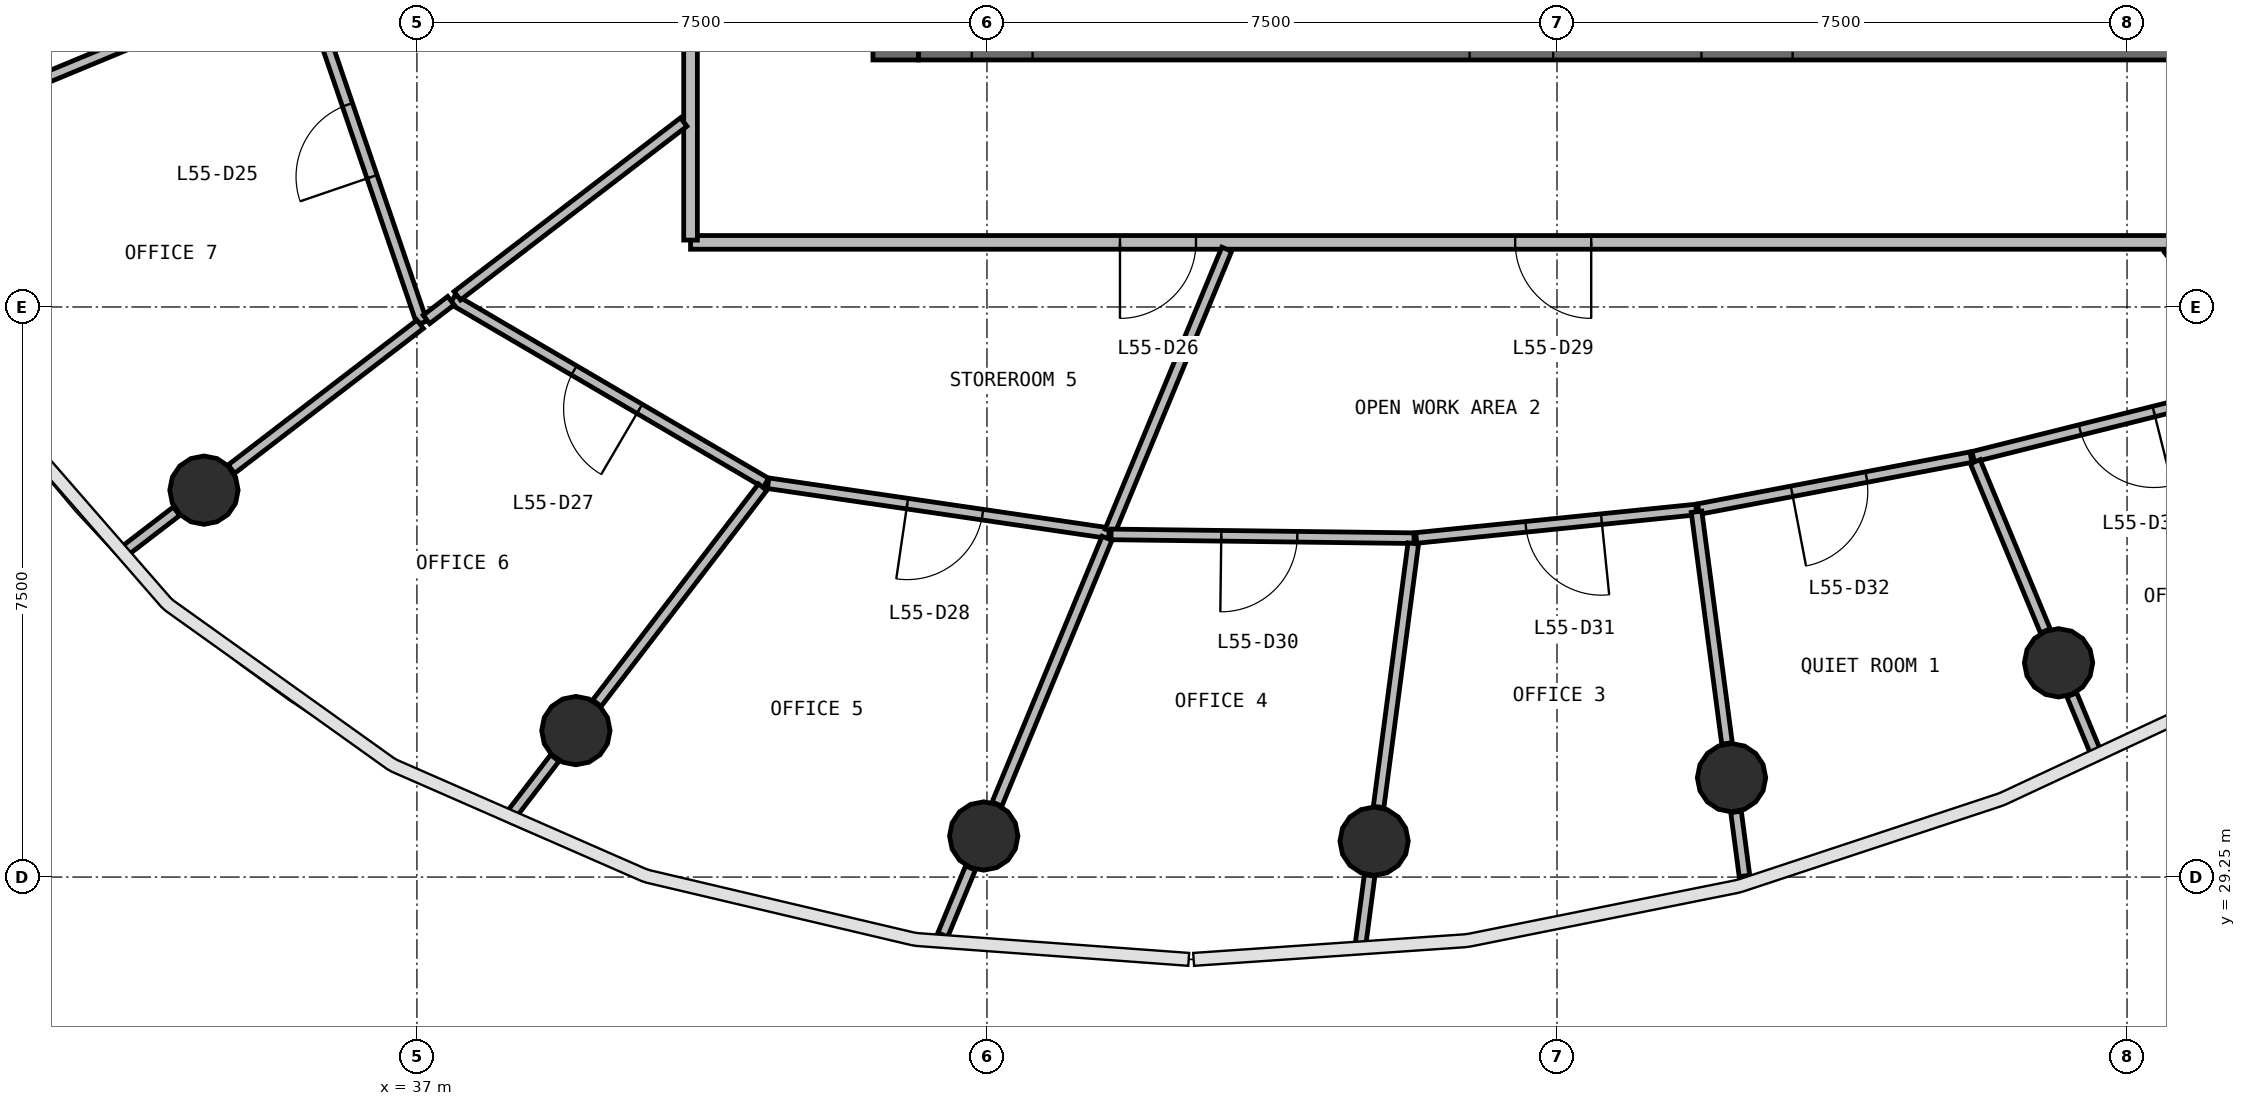
"""IFC4 building model, lengths in metres.
Left out: names, types, materials, properties, quantities, classifications, styles, units other than length and angle.
Written with IfcOpenShell. Run it as: python <this file> out.ifc"""

import sys

from ifc_helpers import new_model, si_unit, direction, frame, frame_2d, origin, origin_2d, place, context, subcontext, project, spatial, rectangle, circle, extrude, source, transform, mapped, element, fill, save


model = new_model("IFC4")
c1 = context("Model", 3, precision=1e-05, world=origin(), true_north=direction((0.0, 1.0)))
c2 = subcontext(c1, "Body", "Model", "MODEL_VIEW")
j1 = project(units=[si_unit("LENGTHUNIT", "METRE"), si_unit("PLANEANGLEUNIT", "RADIAN")], contexts=[c1])
p1 = place(None, origin())
s1 = spatial("IfcSite", under=j1, at=p1, CompositionType="ELEMENT")
p2 = place(p1, origin())
s2 = spatial("IfcBuilding", under=s1, at=p2, CompositionType="ELEMENT")
p3 = place(p2, frame((0.0, 0.0, 226.7)))
s3 = spatial("IfcBuildingStorey", under=s2, at=p3, CompositionType="ELEMENT", Elevation=226.7)
p4 = place(p3, frame((43.3, 56.0, 0.0), z_axis=(0.0, 0.0, 1.0), x_axis=(0.0, -1.0, 0.0)))
e1 = element("IfcWall", 1, at=p4, inside=s3, PredefinedType="SHEAR", context=c2, shape_type="SweptSolid", body=[
    extrude(rectangle(XDim=16.0, YDim=0.6, at=frame_2d((8.0, 0.0))), origin(), (0.0, 0.0, 1.0), 3.9),
])
p5 = place(p4, frame((7.1, 0.0, 0.0)))
e2 = element("IfcOpeningElement", 2, at=p5, cuts=e1, PredefinedType="OPENING", context=c2, shape_type="SweptSolid", body=[
    extrude(rectangle(XDim=1.8, YDim=2.1, at=frame_2d((0.9, 1.05))), frame((0.0, 0.31, 0.0), z_axis=(0.0, -1.0, 0.0), x_axis=(1.0, 0.0, 0.0)), (0.0, 0.0, 1.0), 0.62),
])
p6 = place(p3, frame((43.6, 40.3, 0.0), z_axis=(0.0, 0.0, 1.0), x_axis=(1.0, 0.0, 0.0)))
e3 = element("IfcWall", 3, at=p6, inside=s3, PredefinedType="SHEAR", context=c2, shape_type="SweptSolid", body=[
    extrude(rectangle(XDim=16.8, YDim=0.6, at=frame_2d((8.4, 0.0))), origin(), (0.0, 0.0, 1.0), 3.9),
])
p7 = place(p6, frame((10.3, 0.0, 0.0)))
e4 = element("IfcOpeningElement", 4, at=p7, cuts=e3, PredefinedType="OPENING", context=c2, shape_type="SweptSolid", body=[
    extrude(rectangle(XDim=1.2, YDim=2.1, at=frame_2d((0.6, 1.05))), frame((0.0, 0.31, 0.0), z_axis=(0.0, -1.0, 0.0), x_axis=(1.0, 0.0, 0.0)), (0.0, 0.0, 1.0), 0.62),
])
p8 = place(p6, frame((7.25, 0.0, 0.0)))
e5 = element("IfcOpeningElement", 5, at=p8, cuts=e3, PredefinedType="OPENING", context=c2, shape_type="SweptSolid", body=[
    extrude(rectangle(XDim=1.1, YDim=2.1, at=frame_2d((0.55, 1.05))), frame((0.0, 0.31, 0.0), z_axis=(0.0, -1.0, 0.0), x_axis=(1.0, 0.0, 0.0)), (0.0, 0.0, 1.0), 0.62),
])
p9 = place(p6, frame((0.7, 0.0, 0.0)))
e6 = element("IfcOpeningElement", 6, at=p9, cuts=e3, PredefinedType="OPENING", context=c2, shape_type="SweptSolid", body=[
    extrude(rectangle(XDim=0.8, YDim=2.1, at=frame_2d((0.4, 1.05))), frame((0.0, 0.31, 0.0), z_axis=(0.0, -1.0, 0.0), x_axis=(1.0, 0.0, 0.0)), (0.0, 0.0, 1.0), 0.62),
])
m1 = source(origin(), c2, "Body", "SweptSolid", [
    extrude(circle(Radius=0.45, at=origin_2d()), origin(), (0.0, 0.0, 1.0), 3.9),
])
for number, where, z_axis, x_axis in (
    (7, (34.198, 34.34, 0.0), (0.0, 0.0, 1.0), (1.0, 0.0, 0.0)),
    (8, (39.091, 31.177, 0.0), (0.0, 0.0, 1.0), (1.0, 0.0, 0.0)),
    (9, (44.457, 29.79, 0.0), (0.0, 0.0, 1.0), (1.0, 0.0, 0.0)),
    (10, (49.594, 29.722, 0.0), (0.0, 0.0, 1.0), (1.0, 0.0, 0.0)),
    (11, (54.296, 30.558, 0.0), (0.0, 0.0, 1.0), (1.0, 0.0, 0.0)),
    (12, (58.599, 32.069, 0.0), (0.0, 0.0, 1.0), (1.0, 0.0, 0.0)),
):
    element("IfcColumn", number, at=place(p3, frame(where, z_axis=z_axis, x_axis=x_axis)), inside=s3, PredefinedType="COLUMN", context=c2, shape_type="MappedRepresentation", body=[
        mapped(m1, transform((0.0, 0.0, 0.0), scale=1.0)),
    ])
p10 = place(p3, frame((63.4, 37.6, 0.0), z_axis=(0.0, 0.0, 1.0), x_axis=(-1.0, 0.0, 0.0)))
e13 = element("IfcWall", 13, at=p10, inside=s3, PredefinedType="PARTITIONING", context=c2, shape_type="SweptSolid", body=[
    extrude(rectangle(XDim=22.8, YDim=0.18, at=frame_2d((11.4, 0.0))), origin(), (0.0, 0.0, 1.0), 2.7),
])
p11 = place(p10, frame((16.15, 0.0, 0.0)))
e14 = element("IfcOpeningElement", 14, at=p11, cuts=e13, PredefinedType="OPENING", context=c2, shape_type="SweptSolid", body=[
    extrude(rectangle(XDim=1.0, YDim=2.1, at=frame_2d((0.5, 1.05))), frame((0.0, 0.1, 0.0), z_axis=(0.0, -1.0, 0.0), x_axis=(1.0, 0.0, 0.0)), (0.0, 0.0, 1.0), 0.2),
])
p12 = place(p10, frame((10.95, 0.0, 0.0)))
e15 = element("IfcOpeningElement", 15, at=p12, cuts=e13, PredefinedType="OPENING", context=c2, shape_type="SweptSolid", body=[
    extrude(rectangle(XDim=1.0, YDim=2.1, at=frame_2d((0.5, 1.05))), frame((0.0, 0.1, 0.0), z_axis=(0.0, -1.0, 0.0), x_axis=(1.0, 0.0, 0.0)), (0.0, 0.0, 1.0), 0.2),
])
p13 = place(p3, frame((40.6, 37.63, 0.0), z_axis=(0.0, 0.0, 1.0), x_axis=(0.0, 1.0, 0.0)))
e16 = element("IfcWall", 16, at=p13, inside=s3, PredefinedType="PARTITIONING", context=c2, shape_type="SweptSolid", body=[
    extrude(rectangle(XDim=20.74, YDim=0.18, at=frame_2d((10.37, 0.0))), origin(), (0.0, 0.0, 1.0), 2.7),
])
p14 = place(p13, frame((15.39, 0.0, 0.0)))
e17 = element("IfcOpeningElement", 17, at=p14, cuts=e16, PredefinedType="OPENING", context=c2, shape_type="SweptSolid", body=[
    extrude(rectangle(XDim=0.9, YDim=2.1, at=frame_2d((0.45, 1.05))), frame((0.0, 0.1, 0.0), z_axis=(0.0, -1.0, 0.0), x_axis=(1.0, 0.0, 0.0)), (0.0, 0.0, 1.0), 0.2),
])
p15 = place(p13, frame((9.89, 0.0, 0.0)))
e18 = element("IfcOpeningElement", 18, at=p15, cuts=e16, PredefinedType="OPENING", context=c2, shape_type="SweptSolid", body=[
    extrude(rectangle(XDim=1.0, YDim=2.1, at=frame_2d((0.5, 1.05))), frame((0.0, 0.1, 0.0), z_axis=(0.0, -1.0, 0.0), x_axis=(1.0, 0.0, 0.0)), (0.0, 0.0, 1.0), 0.2),
])
p16 = place(p3, frame((37.066, 36.541, 0.0), z_axis=(0.0, 0.0, 1.0), x_axis=(-0.323330654383, 0.946286049742, 0.0)))
e19 = element("IfcWall", 19, at=p16, inside=s3, PredefinedType="PARTITIONING", context=c2, shape_type="SweptSolid", body=[
    extrude(rectangle(XDim=4.882, YDim=0.14, at=frame_2d((2.441, 0.0))), origin(), (0.0, 0.0, 1.0), 2.7),
])
p17 = place(p16, frame((2.032, 0.0, 0.0)))
e20 = element("IfcOpeningElement", 20, at=p17, cuts=e19, PredefinedType="OPENING", context=c2, shape_type="SweptSolid", body=[
    extrude(rectangle(XDim=1.0, YDim=2.1, at=frame_2d((0.5, 1.05))), frame((0.0, 0.08, 0.0), z_axis=(0.0, -1.0, 0.0), x_axis=(1.0, 0.0, 0.0)), (0.0, 0.0, 1.0), 0.16),
])
p18 = place(p3, frame((41.592, 34.436, 0.0), z_axis=(0.0, 0.0, 1.0), x_axis=(-0.862711041689, 0.505697200455, 0.0)))
e21 = element("IfcWall", 21, at=p18, inside=s3, PredefinedType="PARTITIONING", context=c2, shape_type="SweptSolid", body=[
    extrude(rectangle(XDim=4.777, YDim=0.14, at=frame_2d((2.388, 0.0))), origin(), (0.0, 0.0, 1.0), 2.7),
])
p19 = place(p18, frame((1.927, 0.0, 0.0)))
e22 = element("IfcOpeningElement", 22, at=p19, cuts=e21, PredefinedType="OPENING", context=c2, shape_type="SweptSolid", body=[
    extrude(rectangle(XDim=1.0, YDim=2.1, at=frame_2d((0.5, 1.05))), frame((0.0, 0.08, 0.0), z_axis=(0.0, -1.0, 0.0), x_axis=(1.0, 0.0, 0.0)), (0.0, 0.0, 1.0), 0.16),
])
p20 = place(p3, frame((46.107, 33.774, 0.0), z_axis=(0.0, 0.0, 1.0), x_axis=(-0.989422644007, 0.145061474991, 0.0)))
e23 = element("IfcWall", 23, at=p20, inside=s3, PredefinedType="PARTITIONING", context=c2, shape_type="SweptSolid", body=[
    extrude(rectangle(XDim=4.534, YDim=0.14, at=frame_2d((2.267, 0.0))), origin(), (0.0, 0.0, 1.0), 2.7),
])
p21 = place(p20, frame((1.684, 0.0, 0.0)))
e24 = element("IfcOpeningElement", 24, at=p21, cuts=e23, PredefinedType="OPENING", context=c2, shape_type="SweptSolid", body=[
    extrude(rectangle(XDim=1.0, YDim=2.1, at=frame_2d((0.5, 1.05))), frame((0.0, 0.08, 0.0), z_axis=(0.0, -1.0, 0.0), x_axis=(1.0, 0.0, 0.0)), (0.0, 0.0, 1.0), 0.16),
])
p22 = place(p3, frame((47.655, 37.51, 0.0), z_axis=(0.0, 0.0, 1.0), x_axis=(-0.382636499574, -0.923898971313, 0.0)))
e25 = element("IfcWall", 25, at=p22, inside=s3, PredefinedType="PARTITIONING", context=c2, shape_type="SweptSolid", body=[
    extrude(rectangle(XDim=4.014, YDim=0.14, at=frame_2d((2.007, 0.0))), origin(), (0.0, 0.0, 1.0), 2.7),
])
p23 = place(p3, frame((35.423, 41.134, 0.0), z_axis=(0.0, 0.0, 1.0), x_axis=(-0.923885083547, -0.382670030705, 0.0)))
e26 = element("IfcWall", 26, at=p23, inside=s3, PredefinedType="PARTITIONING", context=c2, shape_type="SweptSolid", body=[
    extrude(rectangle(XDim=4.065, YDim=0.14, at=frame_2d((2.033, 0.0))), origin(), (0.0, 0.0, 1.0), 2.7),
])
p24 = place(p3, frame((61.392, 35.76, 0.0), z_axis=(0.0, 0.0, 1.0), x_axis=(-0.970103355672, -0.242692149262, 0.0)))
e27 = element("IfcWall", 27, at=p24, inside=s3, PredefinedType="PARTITIONING", context=c2, shape_type="SweptSolid", body=[
    extrude(rectangle(XDim=4.037, YDim=0.14, at=frame_2d((2.019, 0.0))), origin(), (0.0, 0.0, 1.0), 2.7),
])
p25 = place(p24, frame((1.587, 0.0, 0.0)))
e28 = element("IfcOpeningElement", 28, at=p25, cuts=e27, PredefinedType="OPENING", context=c2, shape_type="SweptSolid", body=[
    extrude(rectangle(XDim=1.0, YDim=2.1, at=frame_2d((0.5, 1.05))), frame((0.0, 0.08, 0.0), z_axis=(0.0, -1.0, 0.0), x_axis=(1.0, 0.0, 0.0)), (0.0, 0.0, 1.0), 0.16),
])
p26 = place(p3, frame((50.118, 33.708, 0.0), z_axis=(0.0, 0.0, 1.0), x_axis=(-0.999921931992, 0.012495195965, 0.0)))
e29 = element("IfcWall", 29, at=p26, inside=s3, PredefinedType="PARTITIONING", context=c2, shape_type="SweptSolid", body=[
    extrude(rectangle(XDim=3.986, YDim=0.14, at=frame_2d((1.993, 0.0))), origin(), (0.0, 0.0, 1.0), 2.7),
])
p27 = place(p26, frame((1.536, 0.0, 0.0)))
e30 = element("IfcOpeningElement", 30, at=p27, cuts=e29, PredefinedType="OPENING", context=c2, shape_type="SweptSolid", body=[
    extrude(rectangle(XDim=1.0, YDim=2.1, at=frame_2d((0.5, 1.05))), frame((0.0, 0.08, 0.0), z_axis=(0.0, -1.0, 0.0), x_axis=(1.0, 0.0, 0.0)), (0.0, 0.0, 1.0), 0.16),
])
p28 = place(p3, frame((40.51, 39.183, 0.0), z_axis=(0.0, 0.0, 1.0), x_axis=(-0.793375044347, -0.608733142688, 0.0)))
e31 = element("IfcWall", 31, at=p28, inside=s3, PredefinedType="PARTITIONING", context=c2, shape_type="SweptSolid", body=[
    extrude(rectangle(XDim=3.755, YDim=0.14, at=frame_2d((1.877, 0.0))), origin(), (0.0, 0.0, 1.0), 2.7),
])
p29 = place(p3, frame((46.08, 33.707, 0.0), z_axis=(0.0, 0.0, 1.0), x_axis=(-0.382686051964, -0.923878447434, 0.0)))
e32 = element("IfcWall", 32, at=p29, inside=s3, PredefinedType="PARTITIONING", context=c2, shape_type="SweptSolid", body=[
    extrude(rectangle(XDim=3.784, YDim=0.14, at=frame_2d((1.892, 0.0))), origin(), (0.0, 0.0, 1.0), 2.7),
])
p30 = place(p3, frame((53.832, 34.085, 0.0), z_axis=(0.0, 0.0, 1.0), x_axis=(-0.994884574055, -0.101018237503, 0.0)))
e33 = element("IfcWall", 33, at=p30, inside=s3, PredefinedType="PARTITIONING", context=c2, shape_type="SweptSolid", body=[
    extrude(rectangle(XDim=3.703, YDim=0.14, at=frame_2d((1.851, 0.0))), origin(), (0.0, 0.0, 1.0), 2.7),
])
p31 = place(p30, frame((1.253, 0.0, 0.0)))
e34 = element("IfcOpeningElement", 34, at=p31, cuts=e33, PredefinedType="OPENING", context=c2, shape_type="SweptSolid", body=[
    extrude(rectangle(XDim=1.0, YDim=2.1, at=frame_2d((0.5, 1.05))), frame((0.0, 0.08, 0.0), z_axis=(0.0, -1.0, 0.0), x_axis=(1.0, 0.0, 0.0)), (0.0, 0.0, 1.0), 0.16),
])
p32 = place(p3, frame((57.446, 34.775, 0.0), z_axis=(0.0, 0.0, 1.0), x_axis=(-0.982288762834, -0.18737338768, 0.0)))
e35 = element("IfcWall", 35, at=p32, inside=s3, PredefinedType="PARTITIONING", context=c2, shape_type="SweptSolid", body=[
    extrude(rectangle(XDim=3.65, YDim=0.14, at=frame_2d((1.825, 0.0))), origin(), (0.0, 0.0, 1.0), 2.7),
])
p33 = place(p32, frame((1.4, 0.0, 0.0)))
e36 = element("IfcOpeningElement", 36, at=p33, cuts=e35, PredefinedType="OPENING", context=c2, shape_type="SweptSolid", body=[
    extrude(rectangle(XDim=1.0, YDim=2.1, at=frame_2d((0.5, 1.05))), frame((0.0, 0.08, 0.0), z_axis=(0.0, -1.0, 0.0), x_axis=(1.0, 0.0, 0.0)), (0.0, 0.0, 1.0), 0.16),
])
p34 = place(p3, frame((41.549, 34.38, 0.0), z_axis=(0.0, 0.0, 1.0), x_axis=(-0.608751958666, -0.793360607051, 0.0)))
e37 = element("IfcWall", 37, at=p34, inside=s3, PredefinedType="PARTITIONING", context=c2, shape_type="SweptSolid", body=[
    extrude(rectangle(XDim=3.583, YDim=0.14, at=frame_2d((1.791, 0.0))), origin(), (0.0, 0.0, 1.0), 2.7),
])
p35 = place(p3, frame((50.109, 33.638, 0.0), z_axis=(0.0, 0.0, 1.0), x_axis=(-0.130599038576, -0.991435268247, 0.0)))
e38 = element("IfcWall", 38, at=p35, inside=s3, PredefinedType="PARTITIONING", context=c2, shape_type="SweptSolid", body=[
    extrude(rectangle(XDim=3.496, YDim=0.14, at=frame_2d((1.748, 0.0))), origin(), (0.0, 0.0, 1.0), 2.7),
])
p36 = place(p3, frame((37.042, 36.523, 0.0), z_axis=(0.0, 0.0, 1.0), x_axis=(-0.7933452348, -0.608771992145, 0.0)))
e39 = element("IfcWall", 39, at=p36, inside=s3, PredefinedType="PARTITIONING", context=c2, shape_type="SweptSolid", body=[
    extrude(rectangle(XDim=3.131, YDim=0.14, at=frame_2d((1.565, 0.0))), origin(), (0.0, 0.0, 1.0), 2.7),
])
p37 = place(p3, frame((53.836, 34.055, 0.0), z_axis=(0.0, 0.0, 1.0), x_axis=(0.130581901297, -0.991437525542, 0.0)))
e40 = element("IfcWall", 40, at=p37, inside=s3, PredefinedType="PARTITIONING", context=c2, shape_type="SweptSolid", body=[
    extrude(rectangle(XDim=3.074, YDim=0.14, at=frame_2d((1.537, 0.0))), origin(), (0.0, 0.0, 1.0), 2.7),
])
p38 = place(p3, frame((57.503, 34.715, 0.0), z_axis=(0.0, 0.0, 1.0), x_axis=(0.382736621099, -0.923857499222, 0.0)))
e41 = element("IfcWall", 41, at=p38, inside=s3, PredefinedType="PARTITIONING", context=c2, shape_type="SweptSolid", body=[
    extrude(rectangle(XDim=2.409, YDim=0.14, at=frame_2d((1.205, 0.0))), origin(), (0.0, 0.0, 1.0), 2.7),
])
p39 = place(p3, frame((60.049, 37.51, 0.0), z_axis=(0.0, 0.0, 1.0), x_axis=(0.608713079652, -0.793390437717, 0.0)))
e42 = element("IfcWall", 42, at=p39, inside=s3, PredefinedType="PARTITIONING", context=c2, shape_type="SweptSolid", body=[
    extrude(rectangle(XDim=2.13, YDim=0.14, at=frame_2d((1.065, 0.0))), origin(), (0.0, 0.0, 1.0), 2.7),
])
p40 = place(p3, frame((44.283, 29.37, 0.0), z_axis=(0.0, 0.0, 1.0), x_axis=(-0.382721574091, -0.923863732769, 0.0)))
e43 = element("IfcWall", 43, at=p40, inside=s3, PredefinedType="PARTITIONING", context=c2, shape_type="SweptSolid", body=[
    extrude(rectangle(XDim=0.952, YDim=0.14, at=frame_2d((0.476, 0.0))), origin(), (0.0, 0.0, 1.0), 2.7),
])
p41 = place(p3, frame((38.814, 30.816, 0.0), z_axis=(0.0, 0.0, 1.0), x_axis=(-0.608637437939, -0.793448466593, 0.0)))
e44 = element("IfcWall", 44, at=p41, inside=s3, PredefinedType="PARTITIONING", context=c2, shape_type="SweptSolid", body=[
    extrude(rectangle(XDim=0.946, YDim=0.14, at=frame_2d((0.473, 0.0))), origin(), (0.0, 0.0, 1.0), 2.7),
])
p42 = place(p3, frame((49.534, 29.271, 0.0), z_axis=(0.0, 0.0, 1.0), x_axis=(-0.130419732187, -0.991458871288, 0.0)))
e45 = element("IfcWall", 45, at=p42, inside=s3, PredefinedType="PARTITIONING", context=c2, shape_type="SweptSolid", body=[
    extrude(rectangle(XDim=0.908, YDim=0.14, at=frame_2d((0.454, 0.0))), origin(), (0.0, 0.0, 1.0), 2.7),
])
p43 = place(p3, frame((33.837, 34.063, 0.0), z_axis=(0.0, 0.0, 1.0), x_axis=(-0.793325147434, -0.608798168894, 0.0)))
e46 = element("IfcWall", 46, at=p43, inside=s3, PredefinedType="PARTITIONING", context=c2, shape_type="SweptSolid", body=[
    extrude(rectangle(XDim=0.867, YDim=0.14, at=frame_2d((0.433, 0.0))), origin(), (0.0, 0.0, 1.0), 2.7),
])
p44 = place(p3, frame((54.356, 30.107, 0.0), z_axis=(0.0, 0.0, 1.0), x_axis=(0.130469380283, -0.991452339151, 0.0)))
e47 = element("IfcWall", 47, at=p44, inside=s3, PredefinedType="PARTITIONING", context=c2, shape_type="SweptSolid", body=[
    extrude(rectangle(XDim=0.85, YDim=0.14, at=frame_2d((0.425, 0.0))), origin(), (0.0, 0.0, 1.0), 2.7),
])
p45 = place(p3, frame((58.773, 31.648, 0.0), z_axis=(0.0, 0.0, 1.0), x_axis=(0.382631826792, -0.923900906551, 0.0)))
e48 = element("IfcWall", 48, at=p45, inside=s3, PredefinedType="PARTITIONING", context=c2, shape_type="SweptSolid", body=[
    extrude(rectangle(XDim=0.796, YDim=0.14, at=frame_2d((0.398, 0.0))), origin(), (0.0, 0.0, 1.0), 2.7),
])
p46 = place(p3, frame((37.447, 36.833, 0.0), z_axis=(0.0, 0.0, 1.0), x_axis=(-0.793093157812, -0.609100355469, 0.0)))
e49 = element("IfcWall", 49, at=p46, inside=s3, PredefinedType="PARTITIONING", context=c2, shape_type="SweptSolid", body=[
    extrude(rectangle(XDim=0.406, YDim=0.14, at=frame_2d((0.203, 0.0))), origin(), (0.0, 0.0, 1.0), 2.7),
])
m2 = source(origin(), c2, "Body", "SweptSolid", [
    extrude(rectangle(XDim=1.0, YDim=2.1, at=frame_2d((0.5, 1.05))), frame((0.0, 0.025, 0.0), z_axis=(0.0, -1.0, 0.0), x_axis=(1.0, 0.0, 0.0)), (0.0, 0.0, 1.0), 0.05),
])
p47 = place(p17, origin())
e50 = element("IfcDoor", 50, at=p47, inside=s3, OperationType="SINGLE_SWING_LEFT", PredefinedType="DOOR", context=c2, shape_type="MappedRepresentation", body=[
    mapped(m2, transform((0.0, 0.0, 0.0), scale=1.0)),
])
fill(e20, e50)
p48 = place(p11, origin())
e51 = element("IfcDoor", 51, at=p48, inside=s3, OperationType="SINGLE_SWING_RIGHT", PredefinedType="DOOR", context=c2, shape_type="MappedRepresentation", body=[
    mapped(m2, transform((0.0, 0.0, 0.0), scale=1.0)),
])
fill(e14, e51)
p49 = place(p19, origin())
e52 = element("IfcDoor", 52, at=p49, inside=s3, OperationType="SINGLE_SWING_LEFT", PredefinedType="DOOR", context=c2, shape_type="MappedRepresentation", body=[
    mapped(m2, transform((0.0, 0.0, 0.0), scale=1.0)),
])
fill(e22, e52)
p50 = place(p21, origin())
e53 = element("IfcDoor", 53, at=p50, inside=s3, OperationType="SINGLE_SWING_RIGHT", PredefinedType="DOOR", context=c2, shape_type="MappedRepresentation", body=[
    mapped(m2, transform((0.0, 0.0, 0.0), scale=1.0)),
])
fill(e24, e53)
p51 = place(p12, origin())
e54 = element("IfcDoor", 54, at=p51, inside=s3, OperationType="SINGLE_SWING_LEFT", PredefinedType="DOOR", context=c2, shape_type="MappedRepresentation", body=[
    mapped(m2, transform((0.0, 0.0, 0.0), scale=1.0)),
])
fill(e15, e54)
p52 = place(p27, origin())
e55 = element("IfcDoor", 55, at=p52, inside=s3, OperationType="SINGLE_SWING_RIGHT", PredefinedType="DOOR", context=c2, shape_type="MappedRepresentation", body=[
    mapped(m2, transform((0.0, 0.0, 0.0), scale=1.0)),
])
fill(e30, e55)
p53 = place(p31, origin())
e56 = element("IfcDoor", 56, at=p53, inside=s3, OperationType="SINGLE_SWING_LEFT", PredefinedType="DOOR", context=c2, shape_type="MappedRepresentation", body=[
    mapped(m2, transform((0.0, 0.0, 0.0), scale=1.0)),
])
fill(e34, e56)
p54 = place(p33, origin())
e57 = element("IfcDoor", 57, at=p54, inside=s3, OperationType="SINGLE_SWING_RIGHT", PredefinedType="DOOR", context=c2, shape_type="MappedRepresentation", body=[
    mapped(m2, transform((0.0, 0.0, 0.0), scale=1.0)),
])
fill(e36, e57)
p55 = place(p25, origin())
e58 = element("IfcDoor", 58, at=p55, inside=s3, OperationType="SINGLE_SWING_LEFT", PredefinedType="DOOR", context=c2, shape_type="MappedRepresentation", body=[
    mapped(m2, transform((0.0, 0.0, 0.0), scale=1.0)),
])
fill(e28, e58)
save(model, sys.argv[1])
